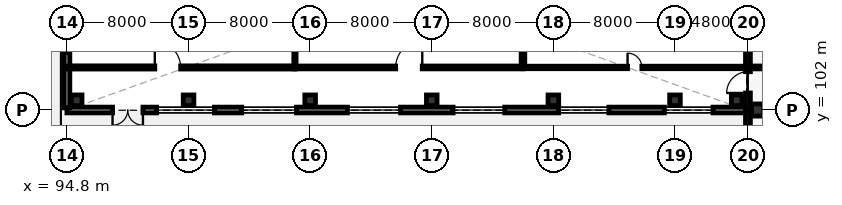
"""IFC4 building model, lengths in metres.
Left out: names, types, materials, properties, quantities, classifications, styles, units other than length and angle.
Written with IfcOpenShell. Run it as: python <this file> out.ifc"""

import sys

from ifc_helpers import new_model, si_unit, direction, frame, frame_2d, origin, origin_2d, place, context, subcontext, project, spatial, rectangle, extrude, element, fill, save


model = new_model("IFC4")
c1 = context("Model", 3, precision=1e-05, world=origin(), true_north=direction((0.0, 1.0)))
c2 = subcontext(c1, "Body", "Model", "MODEL_VIEW")
j1 = project(units=[si_unit("LENGTHUNIT", "METRE"), si_unit("PLANEANGLEUNIT", "RADIAN")], contexts=[c1])
p1 = place(None, origin())
s1 = spatial("IfcSite", under=j1, at=p1, CompositionType="ELEMENT")
p2 = place(p1, origin())
s2 = spatial("IfcBuilding", under=s1, at=p2, CompositionType="ELEMENT")
p3 = place(p2, origin())
s3 = spatial("IfcBuildingStorey", under=s2, at=p3, CompositionType="ELEMENT", Elevation=0.0)
for number, where, z_axis, x_axis in (
    (1, (95.44, 102.64, 0.0), (0.0, 0.0, 1.0), (1.0, 0.0, 0.0)),
    (2, (102.8, 102.64, 0.0), (0.0, 0.0, 1.0), (1.0, 0.0, 0.0)),
    (3, (110.8, 102.64, 0.0), (0.0, 0.0, 1.0), (1.0, 0.0, 0.0)),
    (4, (118.8, 102.64, 0.0), (0.0, 0.0, 1.0), (1.0, 0.0, 0.0)),
    (5, (126.8, 102.64, 0.0), (0.0, 0.0, 1.0), (1.0, 0.0, 0.0)),
    (6, (134.8, 102.64, 0.0), (0.0, 0.0, 1.0), (1.0, 0.0, 0.0)),
    (7, (138.86, 102.64, 0.0), (0.0, 0.0, 1.0), (1.0, 0.0, 0.0)),
):
    element("IfcColumn", number, at=place(p3, frame(where, z_axis=z_axis, x_axis=x_axis)), inside=s3, PredefinedType="COLUMN", context=c2, shape_type="SweptSolid", body=[
        extrude(rectangle(XDim=0.7, YDim=0.7, at=origin_2d()), origin(), (0.0, 0.0, 1.0), 5.4),
    ])
p4 = place(p3, frame((140.24, 102.0, 0.0), z_axis=(0.0, 0.0, 1.0), x_axis=(1.0, 0.0, 0.0)))
e8 = element("IfcColumn", 8, at=p4, inside=s3, PredefinedType="COLUMN", context=c2, shape_type="SweptSolid", body=[
    extrude(rectangle(XDim=0.8, YDim=0.8, at=origin_2d()), origin(), (0.0, 0.0, 1.0), 5.4),
])
p5 = place(p3, frame((139.5, 102.0, 0.0), z_axis=(0.0, 0.0, 1.0), x_axis=(-1.0, 0.0, 0.0)))
e9 = element("IfcWall", 9, at=p5, inside=s3, PredefinedType="SOLIDWALL", context=c2, shape_type="SweptSolid", body=[
    extrude(rectangle(XDim=44.7, YDim=0.38, at=frame_2d((22.35, 0.0))), origin(), (0.0, 0.0, 1.0), 5.12),
])
p6 = place(p5, frame((39.7, 0.0, 0.0)))
e10 = element("IfcOpeningElement", 10, at=p6, cuts=e9, PredefinedType="OPENING", context=c2, shape_type="SweptSolid", body=[
    extrude(rectangle(XDim=2.0, YDim=2.5, at=frame_2d((1.0, 1.25))), frame((0.0, 0.2, 0.0), z_axis=(0.0, -1.0, 0.0), x_axis=(1.0, 0.0, 0.0)), (0.0, 0.0, 1.0), 0.4),
])
p7 = place(p5, frame((2.2, 0.0, 0.9)))
e11 = element("IfcOpeningElement", 11, at=p7, cuts=e9, PredefinedType="OPENING", context=c2, shape_type="SweptSolid", body=[
    extrude(rectangle(XDim=3.2, YDim=2.5, at=frame_2d((1.6, 1.25))), frame((0.0, 0.2, 0.0), z_axis=(0.0, -1.0, 0.0), x_axis=(1.0, 0.0, 0.0)), (0.0, 0.0, 1.0), 0.4),
])
p8 = place(p5, frame((9.05, 0.0, 0.9)))
e12 = element("IfcOpeningElement", 12, at=p8, cuts=e9, PredefinedType="OPENING", context=c2, shape_type="SweptSolid", body=[
    extrude(rectangle(XDim=3.3, YDim=2.5, at=frame_2d((1.65, 1.25))), frame((0.0, 0.2, 0.0), z_axis=(0.0, -1.0, 0.0), x_axis=(1.0, 0.0, 0.0)), (0.0, 0.0, 1.0), 0.4),
])
p9 = place(p5, frame((15.9, 0.0, 0.9)))
e13 = element("IfcOpeningElement", 13, at=p9, cuts=e9, PredefinedType="OPENING", context=c2, shape_type="SweptSolid", body=[
    extrude(rectangle(XDim=3.4, YDim=2.55, at=frame_2d((1.7, 1.275))), frame((0.0, 0.2, 0.0), z_axis=(0.0, -1.0, 0.0), x_axis=(1.0, 0.0, 0.0)), (0.0, 0.0, 1.0), 0.4),
])
p10 = place(p5, frame((22.75, 0.0, 0.9)))
e14 = element("IfcOpeningElement", 14, at=p10, cuts=e9, PredefinedType="OPENING", context=c2, shape_type="SweptSolid", body=[
    extrude(rectangle(XDim=3.5, YDim=2.55, at=frame_2d((1.75, 1.275))), frame((0.0, 0.2, 0.0), z_axis=(0.0, -1.0, 0.0), x_axis=(1.0, 0.0, 0.0)), (0.0, 0.0, 1.0), 0.4),
])
p11 = place(p5, frame((29.6, 0.0, 0.9)))
e15 = element("IfcOpeningElement", 15, at=p11, cuts=e9, PredefinedType="OPENING", context=c2, shape_type="SweptSolid", body=[
    extrude(rectangle(XDim=3.6, YDim=2.6, at=frame_2d((1.8, 1.3))), frame((0.0, 0.2, 0.0), z_axis=(0.0, -1.0, 0.0), x_axis=(1.0, 0.0, 0.0)), (0.0, 0.0, 1.0), 0.4),
])
p12 = place(p5, frame((35.0, 0.0, 0.9)))
e16 = element("IfcOpeningElement", 16, at=p12, cuts=e9, PredefinedType="OPENING", context=c2, shape_type="SweptSolid", body=[
    extrude(rectangle(XDim=3.8, YDim=2.6, at=frame_2d((1.9, 1.3))), frame((0.0, 0.2, 0.0), z_axis=(0.0, -1.0, 0.0), x_axis=(1.0, 0.0, 0.0)), (0.0, 0.0, 1.0), 0.4),
])
p13 = place(p3, frame((94.8, 102.14, 0.0), z_axis=(0.0, 0.0, 1.0), x_axis=(0.0, 1.0, 0.0)))
e17 = element("IfcWall", 17, at=p13, inside=s3, PredefinedType="SOLIDWALL", context=c2, shape_type="SweptSolid", body=[
    extrude(rectangle(XDim=15.72, YDim=0.38, at=frame_2d((7.86, 0.0))), origin(), (0.0, 0.0, 1.0), 5.12),
])
p14 = place(p13, frame((3.65, 0.0, 0.9)))
e18 = element("IfcOpeningElement", 18, at=p14, cuts=e17, PredefinedType="OPENING", context=c2, shape_type="SweptSolid", body=[
    extrude(rectangle(XDim=1.6, YDim=1.65, at=frame_2d((0.8, 0.825))), frame((0.0, 0.2, 0.0), z_axis=(0.0, -1.0, 0.0), x_axis=(1.0, 0.0, 0.0)), (0.0, 0.0, 1.0), 0.4),
])
p15 = place(p13, frame((8.4, 0.0, 0.9)))
e19 = element("IfcOpeningElement", 19, at=p15, cuts=e17, PredefinedType="OPENING", context=c2, shape_type="SweptSolid", body=[
    extrude(rectangle(XDim=1.8, YDim=1.65, at=frame_2d((0.9, 0.825))), frame((0.0, 0.2, 0.0), z_axis=(0.0, -1.0, 0.0), x_axis=(1.0, 0.0, 0.0)), (0.0, 0.0, 1.0), 0.4),
])
p16 = place(p3, frame((139.6, 71.74, 0.0), z_axis=(0.0, 0.0, 1.0), x_axis=(0.0, 1.0, 0.0)))
e20 = element("IfcWall", 20, at=p16, inside=s3, PredefinedType="SOLIDWALL", context=c2, shape_type="SweptSolid", body=[
    extrude(rectangle(XDim=46.12, YDim=0.32, at=frame_2d((23.06, 0.0))), origin(), (0.0, 0.0, 1.0), 4.29),
])
p17 = place(p16, frame((31.38, 0.0, 0.0)))
e21 = element("IfcOpeningElement", 21, at=p17, cuts=e20, PredefinedType="OPENING", context=c2, shape_type="SweptSolid", body=[
    extrude(rectangle(XDim=1.4, YDim=2.25, at=frame_2d((0.7, 1.125))), frame((0.0, 0.17, 0.0), z_axis=(0.0, -1.0, 0.0), x_axis=(1.0, 0.0, 0.0)), (0.0, 0.0, 1.0), 0.34),
])
p18 = place(p3, frame((94.8, 104.8, 0.0), z_axis=(0.0, 0.0, 1.0), x_axis=(1.0, 0.0, 0.0)))
e22 = element("IfcWall", 22, at=p18, inside=s3, PredefinedType="PARTITIONING", context=c2, shape_type="SweptSolid", body=[
    extrude(rectangle(XDim=15.0, YDim=0.21, at=frame_2d((7.5, 0.0))), origin(), (0.0, 0.0, 1.0), 5.12),
])
p19 = place(p18, frame((5.78, 0.0, 0.0)))
e23 = element("IfcOpeningElement", 23, at=p19, cuts=e22, PredefinedType="OPENING", context=c2, shape_type="SweptSolid", body=[
    extrude(rectangle(XDim=1.7, YDim=2.3, at=frame_2d((0.85, 1.15))), frame((0.0, 0.115, 0.0), z_axis=(0.0, -1.0, 0.0), x_axis=(1.0, 0.0, 0.0)), (0.0, 0.0, 1.0), 0.23),
])
p20 = place(p3, frame((109.8, 104.8, 0.0), z_axis=(0.0, 0.0, 1.0), x_axis=(1.0, 0.0, 0.0)))
e24 = element("IfcWall", 24, at=p20, inside=s3, PredefinedType="PARTITIONING", context=c2, shape_type="SweptSolid", body=[
    extrude(rectangle(XDim=15.0, YDim=0.19, at=frame_2d((7.5, 0.0))), origin(), (0.0, 0.0, 1.0), 5.12),
])
p21 = place(p20, frame((6.625, 0.0, 0.0)))
e25 = element("IfcOpeningElement", 25, at=p21, cuts=e24, PredefinedType="OPENING", context=c2, shape_type="SweptSolid", body=[
    extrude(rectangle(XDim=1.75, YDim=2.35, at=frame_2d((0.875, 1.175))), frame((0.0, 0.105, 0.0), z_axis=(0.0, -1.0, 0.0), x_axis=(1.0, 0.0, 0.0)), (0.0, 0.0, 1.0), 0.21),
])
p22 = place(p3, frame((124.8, 104.8, 0.0), z_axis=(0.0, 0.0, 1.0), x_axis=(1.0, 0.0, 0.0)))
e26 = element("IfcWall", 26, at=p22, inside=s3, PredefinedType="PARTITIONING", context=c2, shape_type="SweptSolid", body=[
    extrude(rectangle(XDim=14.7, YDim=0.165, at=frame_2d((7.35, 0.0))), origin(), (0.0, 0.0, 1.0), 5.12),
])
p23 = place(p22, frame((6.88, 0.0, 0.0)))
e27 = element("IfcOpeningElement", 27, at=p23, cuts=e26, PredefinedType="OPENING", context=c2, shape_type="SweptSolid", body=[
    extrude(rectangle(XDim=0.94, YDim=2.15, at=frame_2d((0.47, 1.075))), frame((0.0, 0.093, 0.0), z_axis=(0.0, -1.0, 0.0), x_axis=(1.0, 0.0, 0.0)), (0.0, 0.0, 1.0), 0.185),
])
p24 = place(p3, frame((109.8, 118.0, 0.0), z_axis=(0.0, 0.0, 1.0), x_axis=(0.0, -1.0, 0.0)))
e28 = element("IfcWall", 28, at=p24, inside=s3, PredefinedType="PARTITIONING", context=c2, shape_type="SweptSolid", body=[
    extrude(rectangle(XDim=13.2, YDim=0.15, at=frame_2d((6.6, 0.0))), origin(), (0.0, 0.0, 1.0), 5.12),
])
p25 = place(p3, frame((124.8, 118.0, 0.0), z_axis=(0.0, 0.0, 1.0), x_axis=(0.0, -1.0, 0.0)))
e29 = element("IfcWall", 29, at=p25, inside=s3, PredefinedType="PARTITIONING", context=c2, shape_type="SweptSolid", body=[
    extrude(rectangle(XDim=13.2, YDim=0.24, at=frame_2d((6.6, 0.0))), origin(), (0.0, 0.0, 1.0), 5.12),
])
p26 = place(p3, frame((157.4, 102.0, 0.0), z_axis=(0.0, 0.0, 1.0), x_axis=(-1.0, 0.0, 0.0)))
e30 = element("IfcWall", 30, at=p26, inside=s3, PredefinedType="PARTITIONING", context=c2, shape_type="SweptSolid", body=[
    extrude(rectangle(XDim=17.8, YDim=0.21, at=frame_2d((8.9, 0.0))), origin(), (0.0, 0.0, 1.0), 4.49),
])
p27 = place(p3, frame((139.6, 104.8, 0.0), z_axis=(0.0, 0.0, 1.0), x_axis=(1.0, 0.0, 0.0)))
e31 = element("IfcWall", 31, at=p27, inside=s3, PredefinedType="PARTITIONING", context=c2, shape_type="SweptSolid", body=[
    extrude(rectangle(XDim=17.8, YDim=0.19, at=frame_2d((8.9, 0.0))), origin(), (0.0, 0.0, 1.0), 5.14),
])
p28 = place(p27, frame((8.38, 0.0, 0.0)))
e32 = element("IfcOpeningElement", 32, at=p28, cuts=e31, PredefinedType="OPENING", context=c2, shape_type="SweptSolid", body=[
    extrude(rectangle(XDim=1.04, YDim=2.2, at=frame_2d((0.52, 1.1))), frame((0.0, 0.105, 0.0), z_axis=(0.0, -1.0, 0.0), x_axis=(1.0, 0.0, 0.0)), (0.0, 0.0, 1.0), 0.21),
])
p29 = place(p27, frame((13.184, 0.0, 0.0)))
e33 = element("IfcOpeningElement", 33, at=p29, cuts=e31, PredefinedType="OPENING", context=c2, shape_type="SweptSolid", body=[
    extrude(rectangle(XDim=1.4, YDim=2.25, at=frame_2d((0.7, 1.125))), frame((0.0, 0.105, 0.0), z_axis=(0.0, -1.0, 0.0), x_axis=(1.0, 0.0, 0.0)), (0.0, 0.0, 1.0), 0.21),
])
p30 = place(p6, origin())
e34 = element("IfcDoor", 34, at=p30, inside=s3, OperationType="DOUBLE_SWING_LEFT", PredefinedType="DOOR", context=c2, shape_type="SweptSolid", body=[
    extrude(rectangle(XDim=2.0, YDim=2.5, at=frame_2d((1.0, 1.25))), frame((0.0, 0.025, 0.0), z_axis=(0.0, -1.0, 0.0), x_axis=(1.0, 0.0, 0.0)), (0.0, 0.0, 1.0), 0.05),
])
fill(e10, e34)
p31 = place(p7, origin())
e35 = element("IfcWindow", 35, at=p31, inside=s3, PartitioningType="SINGLE_PANEL", PredefinedType="WINDOW", context=c2, shape_type="SweptSolid", body=[
    extrude(rectangle(XDim=3.2, YDim=2.5, at=frame_2d((1.6, 1.25))), frame((0.0, 0.03, 0.0), z_axis=(0.0, -1.0, 0.0), x_axis=(1.0, 0.0, 0.0)), (0.0, 0.0, 1.0), 0.06),
])
fill(e11, e35)
p32 = place(p8, origin())
e36 = element("IfcWindow", 36, at=p32, inside=s3, PartitioningType="SINGLE_PANEL", PredefinedType="WINDOW", context=c2, shape_type="SweptSolid", body=[
    extrude(rectangle(XDim=3.3, YDim=2.5, at=frame_2d((1.65, 1.25))), frame((0.0, 0.03, 0.0), z_axis=(0.0, -1.0, 0.0), x_axis=(1.0, 0.0, 0.0)), (0.0, 0.0, 1.0), 0.06),
])
fill(e12, e36)
p33 = place(p9, origin())
e37 = element("IfcWindow", 37, at=p33, inside=s3, PartitioningType="SINGLE_PANEL", PredefinedType="WINDOW", context=c2, shape_type="SweptSolid", body=[
    extrude(rectangle(XDim=3.4, YDim=2.55, at=frame_2d((1.7, 1.275))), frame((0.0, 0.03, 0.0), z_axis=(0.0, -1.0, 0.0), x_axis=(1.0, 0.0, 0.0)), (0.0, 0.0, 1.0), 0.06),
])
fill(e13, e37)
p34 = place(p10, origin())
e38 = element("IfcWindow", 38, at=p34, inside=s3, PartitioningType="SINGLE_PANEL", PredefinedType="WINDOW", context=c2, shape_type="SweptSolid", body=[
    extrude(rectangle(XDim=3.5, YDim=2.55, at=frame_2d((1.75, 1.275))), frame((0.0, 0.03, 0.0), z_axis=(0.0, -1.0, 0.0), x_axis=(1.0, 0.0, 0.0)), (0.0, 0.0, 1.0), 0.06),
])
fill(e14, e38)
p35 = place(p11, origin())
e39 = element("IfcWindow", 39, at=p35, inside=s3, PartitioningType="SINGLE_PANEL", PredefinedType="WINDOW", context=c2, shape_type="SweptSolid", body=[
    extrude(rectangle(XDim=3.6, YDim=2.6, at=frame_2d((1.8, 1.3))), frame((0.0, 0.03, 0.0), z_axis=(0.0, -1.0, 0.0), x_axis=(1.0, 0.0, 0.0)), (0.0, 0.0, 1.0), 0.06),
])
fill(e15, e39)
p36 = place(p12, origin())
e40 = element("IfcWindow", 40, at=p36, inside=s3, PartitioningType="SINGLE_PANEL", PredefinedType="WINDOW", context=c2, shape_type="SweptSolid", body=[
    extrude(rectangle(XDim=3.8, YDim=2.6, at=frame_2d((1.9, 1.3))), frame((0.0, 0.03, 0.0), z_axis=(0.0, -1.0, 0.0), x_axis=(1.0, 0.0, 0.0)), (0.0, 0.0, 1.0), 0.06),
])
fill(e16, e40)
p37 = place(p14, origin())
e41 = element("IfcWindow", 41, at=p37, inside=s3, PartitioningType="SINGLE_PANEL", PredefinedType="WINDOW", context=c2, shape_type="SweptSolid", body=[
    extrude(rectangle(XDim=1.6, YDim=1.65, at=frame_2d((0.8, 0.825))), frame((0.0, 0.03, 0.0), z_axis=(0.0, -1.0, 0.0), x_axis=(1.0, 0.0, 0.0)), (0.0, 0.0, 1.0), 0.06),
])
fill(e18, e41)
p38 = place(p17, origin())
e42 = element("IfcDoor", 42, at=p38, inside=s3, OperationType="SINGLE_SWING_LEFT", PredefinedType="DOOR", context=c2, shape_type="SweptSolid", body=[
    extrude(rectangle(XDim=1.4, YDim=2.25, at=frame_2d((0.7, 1.125))), frame((0.0, 0.025, 0.0), z_axis=(0.0, -1.0, 0.0), x_axis=(1.0, 0.0, 0.0)), (0.0, 0.0, 1.0), 0.05),
])
fill(e21, e42)
p39 = place(p19, origin())
e43 = element("IfcDoor", 43, at=p39, inside=s3, OperationType="SINGLE_SWING_LEFT", PredefinedType="DOOR", context=c2, shape_type="SweptSolid", body=[
    extrude(rectangle(XDim=1.7, YDim=2.3, at=frame_2d((0.85, 1.15))), frame((0.0, 0.025, 0.0), z_axis=(0.0, -1.0, 0.0), x_axis=(1.0, 0.0, 0.0)), (0.0, 0.0, 1.0), 0.05),
])
fill(e23, e43)
p40 = place(p21, origin())
e44 = element("IfcDoor", 44, at=p40, inside=s3, OperationType="SINGLE_SWING_RIGHT", PredefinedType="DOOR", context=c2, shape_type="SweptSolid", body=[
    extrude(rectangle(XDim=1.75, YDim=2.35, at=frame_2d((0.875, 1.175))), frame((0.0, 0.025, 0.0), z_axis=(0.0, -1.0, 0.0), x_axis=(1.0, 0.0, 0.0)), (0.0, 0.0, 1.0), 0.05),
])
fill(e25, e44)
p41 = place(p23, origin())
e45 = element("IfcDoor", 45, at=p41, inside=s3, OperationType="SINGLE_SWING_LEFT", PredefinedType="DOOR", context=c2, shape_type="SweptSolid", body=[
    extrude(rectangle(XDim=0.94, YDim=2.15, at=frame_2d((0.47, 1.075))), frame((0.0, 0.025, 0.0), z_axis=(0.0, -1.0, 0.0), x_axis=(1.0, 0.0, 0.0)), (0.0, 0.0, 1.0), 0.05),
])
fill(e27, e45)
save(model, sys.argv[1])
